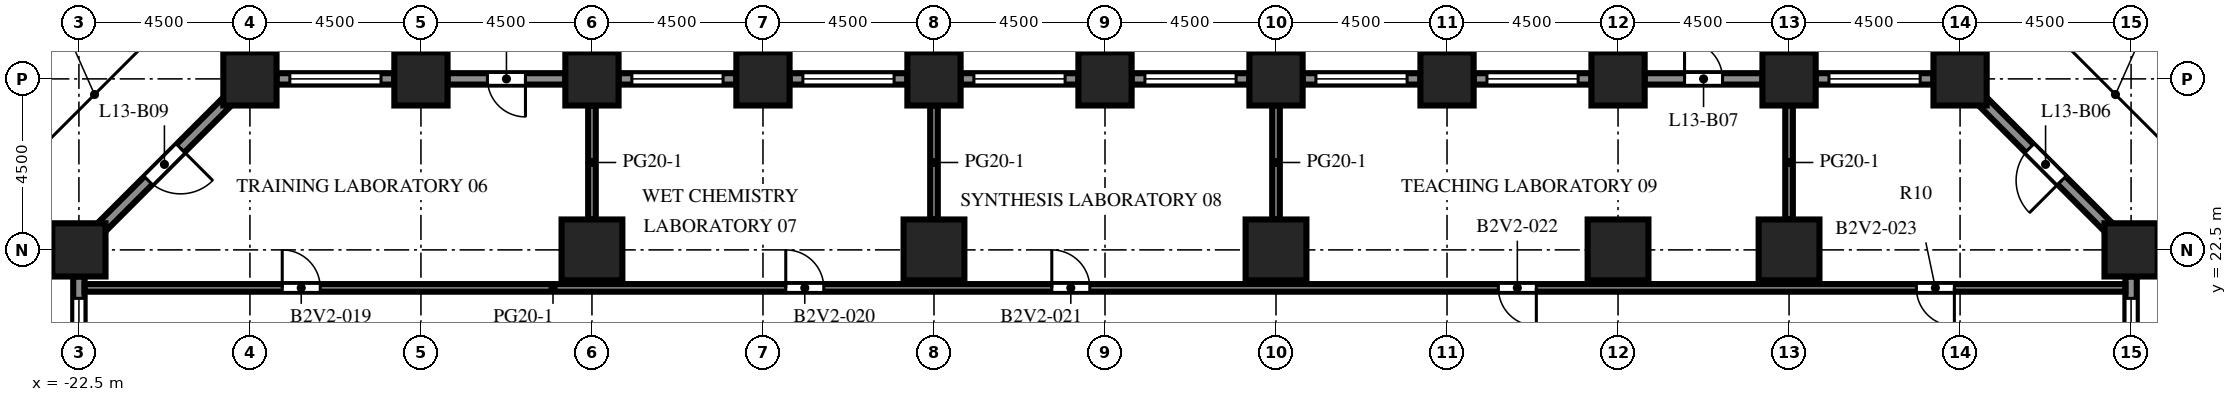
"""IFC4 building model, lengths in metres.
Left out: names, types, materials, properties, quantities, classifications, styles, units other than length and angle.
Written with IfcOpenShell. Run it as: python <this file> out.ifc"""

import sys

from ifc_helpers import new_model, si_unit, direction, frame, frame_2d, origin, origin_2d, place, context, subcontext, project, spatial, rectangle, extrude, element, fill, save


model = new_model("IFC4")
c1 = context("Model", 3, precision=1e-05, world=origin(), true_north=direction((0.0, 1.0)))
c2 = subcontext(c1, "Body", "Model", "MODEL_VIEW")
j1 = project(units=[si_unit("LENGTHUNIT", "METRE"), si_unit("PLANEANGLEUNIT", "RADIAN")], contexts=[c1])
p1 = place(None, origin())
s1 = spatial("IfcSite", under=j1, at=p1, CompositionType="ELEMENT")
p2 = place(p1, origin())
s2 = spatial("IfcBuilding", under=s1, at=p2, CompositionType="ELEMENT")
p3 = place(p2, frame((0.0, 0.0, 58.3)))
s3 = spatial("IfcBuildingStorey", under=s2, at=p3, CompositionType="ELEMENT", Elevation=58.3)
for number, where, z_axis, x_axis in (
    (1, (-22.5, 22.5, 0.0), (0.0, 0.0, 1.0), (1.0, 0.0, 0.0)),
    (2, (-18.0, 27.0, 0.0), (0.0, 0.0, 1.0), (1.0, 0.0, 0.0)),
    (3, (-13.5, 27.0, 0.0), (0.0, 0.0, 1.0), (1.0, 0.0, 0.0)),
    (4, (-9.0, 27.0, 0.0), (0.0, 0.0, 1.0), (1.0, 0.0, 0.0)),
    (5, (-4.5, 27.0, 0.0), (0.0, 0.0, 1.0), (1.0, 0.0, 0.0)),
    (6, (0.0, 27.0, 0.0), (0.0, 0.0, 1.0), (1.0, 0.0, 0.0)),
    (7, (4.5, 27.0, 0.0), (0.0, 0.0, 1.0), (1.0, 0.0, 0.0)),
    (8, (9.0, 27.0, 0.0), (0.0, 0.0, 1.0), (1.0, 0.0, 0.0)),
    (9, (13.5, 27.0, 0.0), (0.0, 0.0, 1.0), (1.0, 0.0, 0.0)),
    (10, (18.0, 27.0, 0.0), (0.0, 0.0, 1.0), (1.0, 0.0, 0.0)),
    (11, (22.5, 27.0, 0.0), (0.0, 0.0, 1.0), (1.0, 0.0, 0.0)),
    (12, (27.0, 27.0, 0.0), (0.0, 0.0, 1.0), (1.0, 0.0, 0.0)),
    (13, (31.5, 22.5, 0.0), (0.0, 0.0, 1.0), (1.0, 0.0, 0.0)),
):
    element("IfcColumn", number, at=place(p3, frame(where, z_axis=z_axis, x_axis=x_axis)), inside=s3, PredefinedType="COLUMN", context=c2, shape_type="SweptSolid", body=[
        extrude(rectangle(XDim=1.4, YDim=1.4, at=origin_2d()), origin(), (0.0, 0.0, 1.0), 4.1),
    ])
for number, where, z_axis, x_axis in (
    (14, (-9.0, 22.5, 0.0), (0.0, 0.0, 1.0), (1.0, 0.0, 0.0)),
    (15, (0.0, 22.5, 0.0), (0.0, 0.0, 1.0), (1.0, 0.0, 0.0)),
    (16, (9.0, 22.5, 0.0), (0.0, 0.0, 1.0), (1.0, 0.0, 0.0)),
    (17, (18.0, 22.5, 0.0), (0.0, 0.0, 1.0), (1.0, 0.0, 0.0)),
    (18, (22.5, 22.5, 0.0), (0.0, 0.0, 1.0), (1.0, 0.0, 0.0)),
):
    element("IfcColumn", number, at=place(p3, frame(where, z_axis=z_axis, x_axis=x_axis)), inside=s3, PredefinedType="COLUMN", context=c2, shape_type="SweptSolid", body=[
        extrude(rectangle(XDim=1.6, YDim=1.6, at=origin_2d()), origin(), (0.0, 0.0, 1.0), 4.1),
    ])
p4 = place(p3, frame((31.5, 21.8, 0.0), z_axis=(0.0, 0.0, 1.0), x_axis=(0.0, -1.0, 0.0)))
e19 = element("IfcWall", 19, at=p4, inside=s3, PredefinedType="SOLIDWALL", context=c2, shape_type="SweptSolid", body=[
    extrude(rectangle(XDim=3.1, YDim=0.3, at=frame_2d((1.55, 0.0))), origin(), (0.0, 0.0, 1.0), 2.75),
])
p5 = place(p4, frame((0.575, 0.0, 0.8)))
e20 = element("IfcOpeningElement", 20, at=p5, cuts=e19, PredefinedType="OPENING", context=c2, shape_type="SweptSolid", body=[
    extrude(rectangle(XDim=2.4, YDim=1.7, at=frame_2d((1.2, 0.85))), frame((0.0, 0.16, 0.0), z_axis=(0.0, -1.0, 0.0), x_axis=(1.0, 0.0, 0.0)), (0.0, 0.0, 1.0), 0.32),
])
p6 = place(p3, frame((27.594, 26.406, 0.0), z_axis=(0.0, 0.0, 1.0), x_axis=(0.707106781187, -0.707106781187, 0.0)))
e21 = element("IfcWall", 21, at=p6, inside=s3, PredefinedType="SOLIDWALL", context=c2, shape_type="SweptSolid", body=[
    extrude(rectangle(XDim=4.684, YDim=0.3, at=frame_2d((2.342, 0.0))), origin(), (0.0, 0.0, 1.0), 2.75),
])
p7 = place(p6, frame((1.742, 0.0, 0.0)))
e22 = element("IfcOpeningElement", 22, at=p7, cuts=e21, PredefinedType="OPENING", context=c2, shape_type="SweptSolid", body=[
    extrude(rectangle(XDim=1.2, YDim=2.2, at=frame_2d((0.6, 1.1))), frame((0.0, 0.16, 0.0), z_axis=(0.0, -1.0, 0.0), x_axis=(1.0, 0.0, 0.0)), (0.0, 0.0, 1.0), 0.32),
])
p8 = place(p3, frame((23.2, 27.0, 0.0), z_axis=(0.0, 0.0, 1.0), x_axis=(1.0, 0.0, 0.0)))
e23 = element("IfcWall", 23, at=p8, inside=s3, PredefinedType="SOLIDWALL", context=c2, shape_type="SweptSolid", body=[
    extrude(rectangle(XDim=3.1, YDim=0.3, at=frame_2d((1.55, 0.0))), origin(), (0.0, 0.0, 1.0), 2.75),
])
p9 = place(p8, frame((0.35, 0.0, 0.8)))
e24 = element("IfcOpeningElement", 24, at=p9, cuts=e23, PredefinedType="OPENING", context=c2, shape_type="SweptSolid", body=[
    extrude(rectangle(XDim=2.4, YDim=1.7, at=frame_2d((1.2, 0.85))), frame((0.0, 0.16, 0.0), z_axis=(0.0, -1.0, 0.0), x_axis=(1.0, 0.0, 0.0)), (0.0, 0.0, 1.0), 0.32),
])
p10 = place(p3, frame((18.7, 27.0, 0.0), z_axis=(0.0, 0.0, 1.0), x_axis=(1.0, 0.0, 0.0)))
e25 = element("IfcWall", 25, at=p10, inside=s3, PredefinedType="SOLIDWALL", context=c2, shape_type="SweptSolid", body=[
    extrude(rectangle(XDim=3.1, YDim=0.3, at=frame_2d((1.55, 0.0))), origin(), (0.0, 0.0, 1.0), 2.75),
])
p11 = place(p10, frame((1.05, 0.0, 0.0)))
e26 = element("IfcOpeningElement", 26, at=p11, cuts=e25, PredefinedType="OPENING", context=c2, shape_type="SweptSolid", body=[
    extrude(rectangle(XDim=1.0, YDim=2.2, at=frame_2d((0.5, 1.1))), frame((0.0, 0.16, 0.0), z_axis=(0.0, -1.0, 0.0), x_axis=(1.0, 0.0, 0.0)), (0.0, 0.0, 1.0), 0.32),
])
p12 = place(p3, frame((14.2, 27.0, 0.0), z_axis=(0.0, 0.0, 1.0), x_axis=(1.0, 0.0, 0.0)))
e27 = element("IfcWall", 27, at=p12, inside=s3, PredefinedType="SOLIDWALL", context=c2, shape_type="SweptSolid", body=[
    extrude(rectangle(XDim=3.1, YDim=0.3, at=frame_2d((1.55, 0.0))), origin(), (0.0, 0.0, 1.0), 2.75),
])
p13 = place(p12, frame((0.35, 0.0, 0.8)))
e28 = element("IfcOpeningElement", 28, at=p13, cuts=e27, PredefinedType="OPENING", context=c2, shape_type="SweptSolid", body=[
    extrude(rectangle(XDim=2.4, YDim=1.7, at=frame_2d((1.2, 0.85))), frame((0.0, 0.16, 0.0), z_axis=(0.0, -1.0, 0.0), x_axis=(1.0, 0.0, 0.0)), (0.0, 0.0, 1.0), 0.32),
])
p14 = place(p3, frame((9.7, 27.0, 0.0), z_axis=(0.0, 0.0, 1.0), x_axis=(1.0, 0.0, 0.0)))
e29 = element("IfcWall", 29, at=p14, inside=s3, PredefinedType="SOLIDWALL", context=c2, shape_type="SweptSolid", body=[
    extrude(rectangle(XDim=3.1, YDim=0.3, at=frame_2d((1.55, 0.0))), origin(), (0.0, 0.0, 1.0), 2.75),
])
p15 = place(p14, frame((0.35, 0.0, 0.8)))
e30 = element("IfcOpeningElement", 30, at=p15, cuts=e29, PredefinedType="OPENING", context=c2, shape_type="SweptSolid", body=[
    extrude(rectangle(XDim=2.4, YDim=1.7, at=frame_2d((1.2, 0.85))), frame((0.0, 0.16, 0.0), z_axis=(0.0, -1.0, 0.0), x_axis=(1.0, 0.0, 0.0)), (0.0, 0.0, 1.0), 0.32),
])
p16 = place(p3, frame((5.2, 27.0, 0.0), z_axis=(0.0, 0.0, 1.0), x_axis=(1.0, 0.0, 0.0)))
e31 = element("IfcWall", 31, at=p16, inside=s3, PredefinedType="SOLIDWALL", context=c2, shape_type="SweptSolid", body=[
    extrude(rectangle(XDim=3.1, YDim=0.3, at=frame_2d((1.55, 0.0))), origin(), (0.0, 0.0, 1.0), 2.75),
])
p17 = place(p16, frame((0.35, 0.0, 0.8)))
e32 = element("IfcOpeningElement", 32, at=p17, cuts=e31, PredefinedType="OPENING", context=c2, shape_type="SweptSolid", body=[
    extrude(rectangle(XDim=2.4, YDim=1.7, at=frame_2d((1.2, 0.85))), frame((0.0, 0.16, 0.0), z_axis=(0.0, -1.0, 0.0), x_axis=(1.0, 0.0, 0.0)), (0.0, 0.0, 1.0), 0.32),
])
p18 = place(p3, frame((0.7, 27.0, 0.0), z_axis=(0.0, 0.0, 1.0), x_axis=(1.0, 0.0, 0.0)))
e33 = element("IfcWall", 33, at=p18, inside=s3, PredefinedType="SOLIDWALL", context=c2, shape_type="SweptSolid", body=[
    extrude(rectangle(XDim=3.1, YDim=0.3, at=frame_2d((1.55, 0.0))), origin(), (0.0, 0.0, 1.0), 2.75),
])
p19 = place(p18, frame((0.35, 0.0, 0.8)))
e34 = element("IfcOpeningElement", 34, at=p19, cuts=e33, PredefinedType="OPENING", context=c2, shape_type="SweptSolid", body=[
    extrude(rectangle(XDim=2.4, YDim=1.7, at=frame_2d((1.2, 0.85))), frame((0.0, 0.16, 0.0), z_axis=(0.0, -1.0, 0.0), x_axis=(1.0, 0.0, 0.0)), (0.0, 0.0, 1.0), 0.32),
])
p20 = place(p3, frame((-3.8, 27.0, 0.0), z_axis=(0.0, 0.0, 1.0), x_axis=(1.0, 0.0, 0.0)))
e35 = element("IfcWall", 35, at=p20, inside=s3, PredefinedType="SOLIDWALL", context=c2, shape_type="SweptSolid", body=[
    extrude(rectangle(XDim=3.1, YDim=0.3, at=frame_2d((1.55, 0.0))), origin(), (0.0, 0.0, 1.0), 2.75),
])
p21 = place(p20, frame((0.35, 0.0, 0.8)))
e36 = element("IfcOpeningElement", 36, at=p21, cuts=e35, PredefinedType="OPENING", context=c2, shape_type="SweptSolid", body=[
    extrude(rectangle(XDim=2.4, YDim=1.7, at=frame_2d((1.2, 0.85))), frame((0.0, 0.16, 0.0), z_axis=(0.0, -1.0, 0.0), x_axis=(1.0, 0.0, 0.0)), (0.0, 0.0, 1.0), 0.32),
])
p22 = place(p3, frame((-8.3, 27.0, 0.0), z_axis=(0.0, 0.0, 1.0), x_axis=(1.0, 0.0, 0.0)))
e37 = element("IfcWall", 37, at=p22, inside=s3, PredefinedType="SOLIDWALL", context=c2, shape_type="SweptSolid", body=[
    extrude(rectangle(XDim=3.1, YDim=0.3, at=frame_2d((1.55, 0.0))), origin(), (0.0, 0.0, 1.0), 2.75),
])
p23 = place(p22, frame((0.35, 0.0, 0.8)))
e38 = element("IfcOpeningElement", 38, at=p23, cuts=e37, PredefinedType="OPENING", context=c2, shape_type="SweptSolid", body=[
    extrude(rectangle(XDim=2.4, YDim=1.7, at=frame_2d((1.2, 0.85))), frame((0.0, 0.16, 0.0), z_axis=(0.0, -1.0, 0.0), x_axis=(1.0, 0.0, 0.0)), (0.0, 0.0, 1.0), 0.32),
])
p24 = place(p3, frame((-12.8, 27.0, 0.0), z_axis=(0.0, 0.0, 1.0), x_axis=(1.0, 0.0, 0.0)))
e39 = element("IfcWall", 39, at=p24, inside=s3, PredefinedType="SOLIDWALL", context=c2, shape_type="SweptSolid", body=[
    extrude(rectangle(XDim=3.1, YDim=0.3, at=frame_2d((1.55, 0.0))), origin(), (0.0, 0.0, 1.0), 2.75),
])
p25 = place(p24, frame((1.05, 0.0, 0.0)))
e40 = element("IfcOpeningElement", 40, at=p25, cuts=e39, PredefinedType="OPENING", context=c2, shape_type="SweptSolid", body=[
    extrude(rectangle(XDim=1.0, YDim=2.2, at=frame_2d((0.5, 1.1))), frame((0.0, 0.16, 0.0), z_axis=(0.0, -1.0, 0.0), x_axis=(1.0, 0.0, 0.0)), (0.0, 0.0, 1.0), 0.32),
])
p26 = place(p3, frame((-17.3, 27.0, 0.0), z_axis=(0.0, 0.0, 1.0), x_axis=(1.0, 0.0, 0.0)))
e41 = element("IfcWall", 41, at=p26, inside=s3, PredefinedType="SOLIDWALL", context=c2, shape_type="SweptSolid", body=[
    extrude(rectangle(XDim=3.1, YDim=0.3, at=frame_2d((1.55, 0.0))), origin(), (0.0, 0.0, 1.0), 2.75),
])
p27 = place(p26, frame((0.35, 0.0, 0.8)))
e42 = element("IfcOpeningElement", 42, at=p27, cuts=e41, PredefinedType="OPENING", context=c2, shape_type="SweptSolid", body=[
    extrude(rectangle(XDim=2.4, YDim=1.7, at=frame_2d((1.2, 0.85))), frame((0.0, 0.16, 0.0), z_axis=(0.0, -1.0, 0.0), x_axis=(1.0, 0.0, 0.0)), (0.0, 0.0, 1.0), 0.32),
])
p28 = place(p3, frame((-21.906, 23.094, 0.0), z_axis=(0.0, 0.0, 1.0), x_axis=(0.707106781187, 0.707106781187, 0.0)))
e43 = element("IfcWall", 43, at=p28, inside=s3, PredefinedType="SOLIDWALL", context=c2, shape_type="SweptSolid", body=[
    extrude(rectangle(XDim=4.684, YDim=0.3, at=frame_2d((2.342, 0.0))), origin(), (0.0, 0.0, 1.0), 2.75),
])
p29 = place(p28, frame((1.742, 0.0, 0.0)))
e44 = element("IfcOpeningElement", 44, at=p29, cuts=e43, PredefinedType="OPENING", context=c2, shape_type="SweptSolid", body=[
    extrude(rectangle(XDim=1.2, YDim=2.2, at=frame_2d((0.6, 1.1))), frame((0.0, 0.16, 0.0), z_axis=(0.0, -1.0, 0.0), x_axis=(1.0, 0.0, 0.0)), (0.0, 0.0, 1.0), 0.32),
])
p30 = place(p3, frame((-22.5, 18.7, 0.0), z_axis=(0.0, 0.0, 1.0), x_axis=(0.0, 1.0, 0.0)))
e45 = element("IfcWall", 45, at=p30, inside=s3, PredefinedType="SOLIDWALL", context=c2, shape_type="SweptSolid", body=[
    extrude(rectangle(XDim=3.1, YDim=0.3, at=frame_2d((1.55, 0.0))), origin(), (0.0, 0.0, 1.0), 2.75),
])
p31 = place(p30, frame((0.125, 0.0, 0.8)))
e46 = element("IfcOpeningElement", 46, at=p31, cuts=e45, PredefinedType="OPENING", context=c2, shape_type="SweptSolid", body=[
    extrude(rectangle(XDim=2.4, YDim=1.7, at=frame_2d((1.2, 0.85))), frame((0.0, 0.16, 0.0), z_axis=(0.0, -1.0, 0.0), x_axis=(1.0, 0.0, 0.0)), (0.0, 0.0, 1.0), 0.32),
])
for number, where, z_axis, x_axis in (
    (47, (-9.0, 23.3, 0.0), (0.0, 0.0, 1.0), (0.0, 1.0, 0.0)),
    (48, (0.0, 23.3, 0.0), (0.0, 0.0, 1.0), (0.0, 1.0, 0.0)),
    (49, (9.0, 23.3, 0.0), (0.0, 0.0, 1.0), (0.0, 1.0, 0.0)),
    (50, (22.5, 23.3, 0.0), (0.0, 0.0, 1.0), (0.0, 1.0, 0.0)),
):
    element("IfcWall", number, at=place(p3, frame(where, z_axis=z_axis, x_axis=x_axis)), inside=s3, PredefinedType="PARTITIONING", context=c2, shape_type="SweptSolid", body=[
        extrude(rectangle(XDim=3.0, YDim=0.2, at=frame_2d((1.5, 0.0))), origin(), (0.0, 0.0, 1.0), 3.65),
    ])
p32 = place(p3, frame((-22.35, 21.5, 0.0), z_axis=(0.0, 0.0, 1.0), x_axis=(1.0, 0.0, 0.0)))
e51 = element("IfcWall", 51, at=p32, inside=s3, PredefinedType="PARTITIONING", context=c2, shape_type="SweptSolid", body=[
    extrude(rectangle(XDim=53.7, YDim=0.2, at=frame_2d((26.85, 0.0))), origin(), (0.0, 0.0, 1.0), 3.65),
])
p33 = place(p32, frame((5.2, 0.0, 0.0)))
e52 = element("IfcOpeningElement", 52, at=p33, cuts=e51, PredefinedType="OPENING", context=c2, shape_type="SweptSolid", body=[
    extrude(rectangle(XDim=1.0, YDim=2.1, at=frame_2d((0.5, 1.05))), frame((0.0, 0.11, 0.0), z_axis=(0.0, -1.0, 0.0), x_axis=(1.0, 0.0, 0.0)), (0.0, 0.0, 1.0), 0.22),
])
p34 = place(p32, frame((18.45, 0.0, 0.0)))
e53 = element("IfcOpeningElement", 53, at=p34, cuts=e51, PredefinedType="OPENING", context=c2, shape_type="SweptSolid", body=[
    extrude(rectangle(XDim=1.0, YDim=2.1, at=frame_2d((0.5, 1.05))), frame((0.0, 0.11, 0.0), z_axis=(0.0, -1.0, 0.0), x_axis=(1.0, 0.0, 0.0)), (0.0, 0.0, 1.0), 0.22),
])
p35 = place(p32, frame((25.45, 0.0, 0.0)))
e54 = element("IfcOpeningElement", 54, at=p35, cuts=e51, PredefinedType="OPENING", context=c2, shape_type="SweptSolid", body=[
    extrude(rectangle(XDim=1.0, YDim=2.1, at=frame_2d((0.5, 1.05))), frame((0.0, 0.11, 0.0), z_axis=(0.0, -1.0, 0.0), x_axis=(1.0, 0.0, 0.0)), (0.0, 0.0, 1.0), 0.22),
])
p36 = place(p32, frame((37.2, 0.0, 0.0)))
e55 = element("IfcOpeningElement", 55, at=p36, cuts=e51, PredefinedType="OPENING", context=c2, shape_type="SweptSolid", body=[
    extrude(rectangle(XDim=1.0, YDim=2.1, at=frame_2d((0.5, 1.05))), frame((0.0, 0.11, 0.0), z_axis=(0.0, -1.0, 0.0), x_axis=(1.0, 0.0, 0.0)), (0.0, 0.0, 1.0), 0.22),
])
p37 = place(p32, frame((48.2, 0.0, 0.0)))
e56 = element("IfcOpeningElement", 56, at=p37, cuts=e51, PredefinedType="OPENING", context=c2, shape_type="SweptSolid", body=[
    extrude(rectangle(XDim=1.0, YDim=2.1, at=frame_2d((0.5, 1.05))), frame((0.0, 0.11, 0.0), z_axis=(0.0, -1.0, 0.0), x_axis=(1.0, 0.0, 0.0)), (0.0, 0.0, 1.0), 0.22),
])
p38 = place(p5, origin())
e57 = element("IfcWindow", 57, at=p38, inside=s3, PartitioningType="SINGLE_PANEL", PredefinedType="WINDOW", context=c2, shape_type="SweptSolid", body=[
    extrude(rectangle(XDim=2.4, YDim=1.7, at=frame_2d((1.2, 0.85))), frame((0.0, 0.03, 0.0), z_axis=(0.0, -1.0, 0.0), x_axis=(1.0, 0.0, 0.0)), (0.0, 0.0, 1.0), 0.06),
])
fill(e20, e57)
p39 = place(p7, origin())
e58 = element("IfcDoor", 58, at=p39, inside=s3, OperationType="SINGLE_SWING_RIGHT", PredefinedType="DOOR", context=c2, shape_type="SweptSolid", body=[
    extrude(rectangle(XDim=1.2, YDim=2.2, at=frame_2d((0.6, 1.1))), frame((0.0, 0.025, 0.0), z_axis=(0.0, -1.0, 0.0), x_axis=(1.0, 0.0, 0.0)), (0.0, 0.0, 1.0), 0.05),
])
fill(e22, e58)
p40 = place(p9, origin())
e59 = element("IfcWindow", 59, at=p40, inside=s3, PartitioningType="SINGLE_PANEL", PredefinedType="WINDOW", context=c2, shape_type="SweptSolid", body=[
    extrude(rectangle(XDim=2.4, YDim=1.7, at=frame_2d((1.2, 0.85))), frame((0.0, 0.03, 0.0), z_axis=(0.0, -1.0, 0.0), x_axis=(1.0, 0.0, 0.0)), (0.0, 0.0, 1.0), 0.06),
])
fill(e24, e59)
p41 = place(p11, origin())
e60 = element("IfcDoor", 60, at=p41, inside=s3, OperationType="SINGLE_SWING_LEFT", PredefinedType="DOOR", context=c2, shape_type="SweptSolid", body=[
    extrude(rectangle(XDim=1.0, YDim=2.2, at=frame_2d((0.5, 1.1))), frame((0.0, 0.025, 0.0), z_axis=(0.0, -1.0, 0.0), x_axis=(1.0, 0.0, 0.0)), (0.0, 0.0, 1.0), 0.05),
])
fill(e26, e60)
p42 = place(p13, origin())
e61 = element("IfcWindow", 61, at=p42, inside=s3, PartitioningType="SINGLE_PANEL", PredefinedType="WINDOW", context=c2, shape_type="SweptSolid", body=[
    extrude(rectangle(XDim=2.4, YDim=1.7, at=frame_2d((1.2, 0.85))), frame((0.0, 0.03, 0.0), z_axis=(0.0, -1.0, 0.0), x_axis=(1.0, 0.0, 0.0)), (0.0, 0.0, 1.0), 0.06),
])
fill(e28, e61)
p43 = place(p15, origin())
e62 = element("IfcWindow", 62, at=p43, inside=s3, PartitioningType="SINGLE_PANEL", PredefinedType="WINDOW", context=c2, shape_type="SweptSolid", body=[
    extrude(rectangle(XDim=2.4, YDim=1.7, at=frame_2d((1.2, 0.85))), frame((0.0, 0.03, 0.0), z_axis=(0.0, -1.0, 0.0), x_axis=(1.0, 0.0, 0.0)), (0.0, 0.0, 1.0), 0.06),
])
fill(e30, e62)
p44 = place(p17, origin())
e63 = element("IfcWindow", 63, at=p44, inside=s3, PartitioningType="SINGLE_PANEL", PredefinedType="WINDOW", context=c2, shape_type="SweptSolid", body=[
    extrude(rectangle(XDim=2.4, YDim=1.7, at=frame_2d((1.2, 0.85))), frame((0.0, 0.03, 0.0), z_axis=(0.0, -1.0, 0.0), x_axis=(1.0, 0.0, 0.0)), (0.0, 0.0, 1.0), 0.06),
])
fill(e32, e63)
p45 = place(p19, origin())
e64 = element("IfcWindow", 64, at=p45, inside=s3, PartitioningType="SINGLE_PANEL", PredefinedType="WINDOW", context=c2, shape_type="SweptSolid", body=[
    extrude(rectangle(XDim=2.4, YDim=1.7, at=frame_2d((1.2, 0.85))), frame((0.0, 0.03, 0.0), z_axis=(0.0, -1.0, 0.0), x_axis=(1.0, 0.0, 0.0)), (0.0, 0.0, 1.0), 0.06),
])
fill(e34, e64)
p46 = place(p21, origin())
e65 = element("IfcWindow", 65, at=p46, inside=s3, PartitioningType="SINGLE_PANEL", PredefinedType="WINDOW", context=c2, shape_type="SweptSolid", body=[
    extrude(rectangle(XDim=2.4, YDim=1.7, at=frame_2d((1.2, 0.85))), frame((0.0, 0.03, 0.0), z_axis=(0.0, -1.0, 0.0), x_axis=(1.0, 0.0, 0.0)), (0.0, 0.0, 1.0), 0.06),
])
fill(e36, e65)
p47 = place(p23, origin())
e66 = element("IfcWindow", 66, at=p47, inside=s3, PartitioningType="SINGLE_PANEL", PredefinedType="WINDOW", context=c2, shape_type="SweptSolid", body=[
    extrude(rectangle(XDim=2.4, YDim=1.7, at=frame_2d((1.2, 0.85))), frame((0.0, 0.03, 0.0), z_axis=(0.0, -1.0, 0.0), x_axis=(1.0, 0.0, 0.0)), (0.0, 0.0, 1.0), 0.06),
])
fill(e38, e66)
p48 = place(p25, origin())
e67 = element("IfcDoor", 67, at=p48, inside=s3, OperationType="SINGLE_SWING_RIGHT", PredefinedType="DOOR", context=c2, shape_type="SweptSolid", body=[
    extrude(rectangle(XDim=1.0, YDim=2.2, at=frame_2d((0.5, 1.1))), frame((0.0, 0.025, 0.0), z_axis=(0.0, -1.0, 0.0), x_axis=(1.0, 0.0, 0.0)), (0.0, 0.0, 1.0), 0.05),
])
fill(e40, e67)
p49 = place(p27, origin())
e68 = element("IfcWindow", 68, at=p49, inside=s3, PartitioningType="SINGLE_PANEL", PredefinedType="WINDOW", context=c2, shape_type="SweptSolid", body=[
    extrude(rectangle(XDim=2.4, YDim=1.7, at=frame_2d((1.2, 0.85))), frame((0.0, 0.03, 0.0), z_axis=(0.0, -1.0, 0.0), x_axis=(1.0, 0.0, 0.0)), (0.0, 0.0, 1.0), 0.06),
])
fill(e42, e68)
p50 = place(p29, origin())
e69 = element("IfcDoor", 69, at=p50, inside=s3, OperationType="SINGLE_SWING_RIGHT", PredefinedType="DOOR", context=c2, shape_type="SweptSolid", body=[
    extrude(rectangle(XDim=1.2, YDim=2.2, at=frame_2d((0.6, 1.1))), frame((0.0, 0.025, 0.0), z_axis=(0.0, -1.0, 0.0), x_axis=(1.0, 0.0, 0.0)), (0.0, 0.0, 1.0), 0.05),
])
fill(e44, e69)
p51 = place(p31, origin())
e70 = element("IfcWindow", 70, at=p51, inside=s3, PartitioningType="SINGLE_PANEL", PredefinedType="WINDOW", context=c2, shape_type="SweptSolid", body=[
    extrude(rectangle(XDim=2.4, YDim=1.7, at=frame_2d((1.2, 0.85))), frame((0.0, 0.03, 0.0), z_axis=(0.0, -1.0, 0.0), x_axis=(1.0, 0.0, 0.0)), (0.0, 0.0, 1.0), 0.06),
])
fill(e46, e70)
p52 = place(p33, origin())
e71 = element("IfcDoor", 71, at=p52, inside=s3, OperationType="SINGLE_SWING_LEFT", PredefinedType="DOOR", context=c2, shape_type="SweptSolid", body=[
    extrude(rectangle(XDim=1.0, YDim=2.1, at=frame_2d((0.5, 1.05))), frame((0.0, 0.025, 0.0), z_axis=(0.0, -1.0, 0.0), x_axis=(1.0, 0.0, 0.0)), (0.0, 0.0, 1.0), 0.05),
])
fill(e52, e71)
p53 = place(p34, origin())
e72 = element("IfcDoor", 72, at=p53, inside=s3, OperationType="SINGLE_SWING_LEFT", PredefinedType="DOOR", context=c2, shape_type="SweptSolid", body=[
    extrude(rectangle(XDim=1.0, YDim=2.1, at=frame_2d((0.5, 1.05))), frame((0.0, 0.025, 0.0), z_axis=(0.0, -1.0, 0.0), x_axis=(1.0, 0.0, 0.0)), (0.0, 0.0, 1.0), 0.05),
])
fill(e53, e72)
p54 = place(p35, origin())
e73 = element("IfcDoor", 73, at=p54, inside=s3, OperationType="SINGLE_SWING_LEFT", PredefinedType="DOOR", context=c2, shape_type="SweptSolid", body=[
    extrude(rectangle(XDim=1.0, YDim=2.1, at=frame_2d((0.5, 1.05))), frame((0.0, 0.025, 0.0), z_axis=(0.0, -1.0, 0.0), x_axis=(1.0, 0.0, 0.0)), (0.0, 0.0, 1.0), 0.05),
])
fill(e54, e73)
p55 = place(p36, origin())
e74 = element("IfcDoor", 74, at=p55, inside=s3, OperationType="SINGLE_SWING_RIGHT", PredefinedType="DOOR", context=c2, shape_type="SweptSolid", body=[
    extrude(rectangle(XDim=1.0, YDim=2.1, at=frame_2d((0.5, 1.05))), frame((0.0, 0.025, 0.0), z_axis=(0.0, -1.0, 0.0), x_axis=(1.0, 0.0, 0.0)), (0.0, 0.0, 1.0), 0.05),
])
fill(e55, e74)
p56 = place(p37, origin())
e75 = element("IfcDoor", 75, at=p56, inside=s3, OperationType="SINGLE_SWING_RIGHT", PredefinedType="DOOR", context=c2, shape_type="SweptSolid", body=[
    extrude(rectangle(XDim=1.0, YDim=2.1, at=frame_2d((0.5, 1.05))), frame((0.0, 0.025, 0.0), z_axis=(0.0, -1.0, 0.0), x_axis=(1.0, 0.0, 0.0)), (0.0, 0.0, 1.0), 0.05),
])
fill(e56, e75)
save(model, sys.argv[1])
